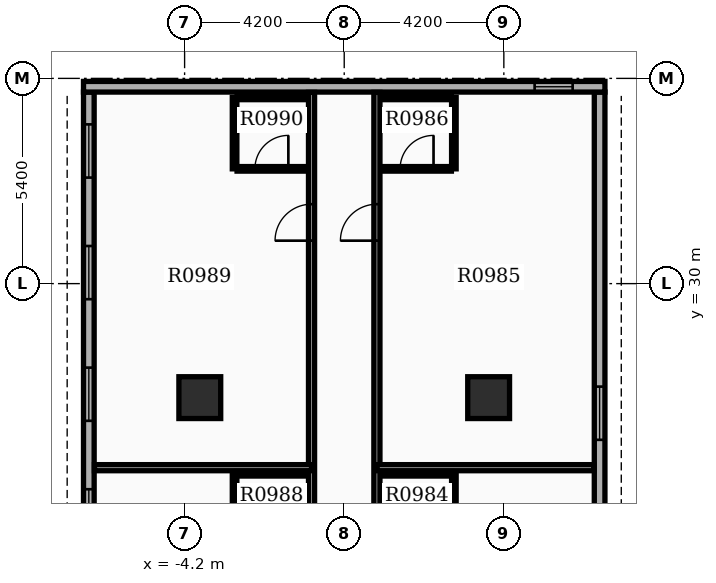
"""IFC4 building model, lengths in metres.
Left out: names, types, materials, properties, quantities, classifications, styles, units other than length and angle.
Written with IfcOpenShell. Run it as: python <this file> out.ifc"""

import sys

from ifc_helpers import new_model, si_unit, direction, frame, frame_2d, origin, origin_2d, place, context, subcontext, project, spatial, rectangle, extrude, element, fill, save


model = new_model("IFC4")
c1 = context("Model", 3, precision=1e-05, world=origin(), true_north=direction((0.0, 1.0)))
c2 = subcontext(c1, "Body", "Model", "MODEL_VIEW")
j1 = project(units=[si_unit("LENGTHUNIT", "METRE"), si_unit("PLANEANGLEUNIT", "RADIAN")], contexts=[c1])
p1 = place(None, origin())
s1 = spatial("IfcSite", under=j1, at=p1, CompositionType="ELEMENT")
p2 = place(p1, origin())
s2 = spatial("IfcBuilding", under=s1, at=p2, CompositionType="ELEMENT")
p3 = place(p2, frame((0.0, 0.0, 63.9)))
s3 = spatial("IfcBuildingStorey", under=s2, at=p3, CompositionType="ELEMENT", Elevation=63.9)
for number, where, z_axis, x_axis in (
    (1, (-3.8, 27.0, 0.0), (0.0, 0.0, 1.0), (1.0, 0.0, 0.0)),
    (2, (3.8, 27.0, 0.0), (0.0, 0.0, 1.0), (1.0, 0.0, 0.0)),
):
    element("IfcColumn", number, at=place(p3, frame(where, z_axis=z_axis, x_axis=x_axis)), inside=s3, PredefinedType="COLUMN", context=c2, shape_type="SweptSolid", body=[
        extrude(rectangle(XDim=1.1, YDim=1.1, at=origin_2d()), origin(), (0.0, 0.0, 1.0), 3.9),
    ])
p4 = place(p3, frame((6.72, 14.94, 0.0), z_axis=(0.0, 0.0, 1.0), x_axis=(0.0, 1.0, 0.0)))
e3 = element("IfcWall", 3, at=p4, inside=s3, PredefinedType="STANDARD", context=c2, shape_type="SweptSolid", body=[
    extrude(rectangle(XDim=20.1, YDim=0.28, at=frame_2d((10.05, 0.0))), origin(), (0.0, 0.0, 1.0), 2.91),
])
p5 = place(p4, frame((0.85, 0.0, 0.8)))
e4 = element("IfcOpeningElement", 4, at=p5, cuts=e3, PredefinedType="OPENING", context=c2, shape_type="SweptSolid", body=[
    extrude(rectangle(XDim=1.4, YDim=1.6, at=frame_2d((0.7, 0.8))), frame((0.0, 0.15, 0.0), z_axis=(0.0, -1.0, 0.0), x_axis=(1.0, 0.0, 0.0)), (0.0, 0.0, 1.0), 0.3),
])
p6 = place(p4, frame((4.05, 0.0, 0.8)))
e5 = element("IfcOpeningElement", 5, at=p6, cuts=e3, PredefinedType="OPENING", context=c2, shape_type="SweptSolid", body=[
    extrude(rectangle(XDim=1.4, YDim=1.6, at=frame_2d((0.7, 0.8))), frame((0.0, 0.15, 0.0), z_axis=(0.0, -1.0, 0.0), x_axis=(1.0, 0.0, 0.0)), (0.0, 0.0, 1.0), 0.3),
])
p7 = place(p4, frame((7.25, 0.0, 0.8)))
e6 = element("IfcOpeningElement", 6, at=p7, cuts=e3, PredefinedType="OPENING", context=c2, shape_type="SweptSolid", body=[
    extrude(rectangle(XDim=1.4, YDim=1.6, at=frame_2d((0.7, 0.8))), frame((0.0, 0.15, 0.0), z_axis=(0.0, -1.0, 0.0), x_axis=(1.0, 0.0, 0.0)), (0.0, 0.0, 1.0), 0.3),
])
p8 = place(p4, frame((10.95, 0.0, 0.8)))
e7 = element("IfcOpeningElement", 7, at=p8, cuts=e3, PredefinedType="OPENING", context=c2, shape_type="SweptSolid", body=[
    extrude(rectangle(XDim=1.4, YDim=1.6, at=frame_2d((0.7, 0.8))), frame((0.0, 0.15, 0.0), z_axis=(0.0, -1.0, 0.0), x_axis=(1.0, 0.0, 0.0)), (0.0, 0.0, 1.0), 0.3),
])
p9 = place(p3, frame((-6.72, 35.04, 0.0), z_axis=(0.0, 0.0, 1.0), x_axis=(0.0, -1.0, 0.0)))
e8 = element("IfcWall", 8, at=p9, inside=s3, PredefinedType="STANDARD", context=c2, shape_type="SweptSolid", body=[
    extrude(rectangle(XDim=20.1, YDim=0.28, at=frame_2d((10.05, 0.0))), origin(), (0.0, 0.0, 1.0), 2.91),
])
p10 = place(p9, frame((0.85, 0.0, 0.8)))
e9 = element("IfcOpeningElement", 9, at=p10, cuts=e8, PredefinedType="OPENING", context=c2, shape_type="SweptSolid", body=[
    extrude(rectangle(XDim=1.4, YDim=1.6, at=frame_2d((0.7, 0.8))), frame((0.0, 0.15, 0.0), z_axis=(0.0, -1.0, 0.0), x_axis=(1.0, 0.0, 0.0)), (0.0, 0.0, 1.0), 0.3),
])
p11 = place(p9, frame((4.05, 0.0, 0.8)))
e10 = element("IfcOpeningElement", 10, at=p11, cuts=e8, PredefinedType="OPENING", context=c2, shape_type="SweptSolid", body=[
    extrude(rectangle(XDim=1.4, YDim=1.6, at=frame_2d((0.7, 0.8))), frame((0.0, 0.15, 0.0), z_axis=(0.0, -1.0, 0.0), x_axis=(1.0, 0.0, 0.0)), (0.0, 0.0, 1.0), 0.3),
])
p12 = place(p9, frame((7.25, 0.0, 0.8)))
e11 = element("IfcOpeningElement", 11, at=p12, cuts=e8, PredefinedType="OPENING", context=c2, shape_type="SweptSolid", body=[
    extrude(rectangle(XDim=1.4, YDim=1.6, at=frame_2d((0.7, 0.8))), frame((0.0, 0.15, 0.0), z_axis=(0.0, -1.0, 0.0), x_axis=(1.0, 0.0, 0.0)), (0.0, 0.0, 1.0), 0.3),
])
p13 = place(p9, frame((10.45, 0.0, 0.8)))
e12 = element("IfcOpeningElement", 12, at=p13, cuts=e8, PredefinedType="OPENING", context=c2, shape_type="SweptSolid", body=[
    extrude(rectangle(XDim=1.4, YDim=1.6, at=frame_2d((0.7, 0.8))), frame((0.0, 0.15, 0.0), z_axis=(0.0, -1.0, 0.0), x_axis=(1.0, 0.0, 0.0)), (0.0, 0.0, 1.0), 0.3),
])
p14 = place(p3, frame((6.86, 35.18, 0.0), z_axis=(0.0, 0.0, 1.0), x_axis=(-1.0, 0.0, 0.0)))
e13 = element("IfcWall", 13, at=p14, inside=s3, PredefinedType="STANDARD", context=c2, shape_type="SweptSolid", body=[
    extrude(rectangle(XDim=13.72, YDim=0.28, at=frame_2d((6.86, 0.0))), origin(), (0.0, 0.0, 1.0), 2.91),
])
p15 = place(p14, frame((0.85, 0.0, 0.85)))
e14 = element("IfcOpeningElement", 14, at=p15, cuts=e13, PredefinedType="OPENING", context=c2, shape_type="SweptSolid", body=[
    extrude(rectangle(XDim=1.0, YDim=1.5, at=frame_2d((0.5, 0.75))), frame((0.0, 0.15, 0.0), z_axis=(0.0, -1.0, 0.0), x_axis=(1.0, 0.0, 0.0)), (0.0, 0.0, 1.0), 0.3),
])
p16 = place(p3, frame((0.86, 14.85, 0.0), z_axis=(0.0, 0.0, 1.0), x_axis=(0.0, 1.0, 0.0)))
e15 = element("IfcWall", 15, at=p16, inside=s3, PredefinedType="PARTITIONING", context=c2, shape_type="SweptSolid", body=[
    extrude(rectangle(XDim=20.182, YDim=0.16, at=frame_2d((10.091, 0.0))), origin(), (0.0, 0.0, 1.0), 2.9),
])
p17 = place(p16, frame((1.106, 0.0, 0.0)))
e16 = element("IfcOpeningElement", 16, at=p17, cuts=e15, PredefinedType="OPENING", context=c2, shape_type="SweptSolid", body=[
    extrude(rectangle(XDim=0.96, YDim=2.15, at=frame_2d((0.48, 1.075))), frame((0.0, 0.09, 0.0), z_axis=(0.0, -1.0, 0.0), x_axis=(1.0, 0.0, 0.0)), (0.0, 0.0, 1.0), 0.18),
])
p18 = place(p16, frame((16.28, 0.0, 0.0)))
e17 = element("IfcOpeningElement", 17, at=p18, cuts=e15, PredefinedType="OPENING", context=c2, shape_type="SweptSolid", body=[
    extrude(rectangle(XDim=0.96, YDim=2.15, at=frame_2d((0.48, 1.075))), frame((0.0, 0.09, 0.0), z_axis=(0.0, -1.0, 0.0), x_axis=(1.0, 0.0, 0.0)), (0.0, 0.0, 1.0), 0.18),
])
p19 = place(p3, frame((0.86, 25.157, 0.0), z_axis=(0.0, 0.0, 1.0), x_axis=(1.0, 0.0, 0.0)))
e18 = element("IfcWall", 18, at=p19, inside=s3, PredefinedType="PARTITIONING", context=c2, shape_type="SweptSolid", body=[
    extrude(rectangle(XDim=5.712, YDim=0.16, at=frame_2d((2.856, 0.0))), origin(), (0.0, 0.0, 1.0), 2.9),
])
p20 = place(p3, frame((1.0, 24.997, 0.0), z_axis=(0.0, 0.0, 1.0), x_axis=(1.0, 0.0, 0.0)))
e19 = element("IfcWall", 19, at=p20, inside=s3, PredefinedType="PARTITIONING", context=c2, shape_type="SweptSolid", body=[
    extrude(rectangle(XDim=1.82, YDim=0.12, at=frame_2d((0.91, 0.0))), origin(), (0.0, 0.0, 1.0), 2.9),
])
p21 = place(p3, frame((2.885, 23.117, 0.0), z_axis=(0.0, 0.0, 1.0), x_axis=(0.0, 1.0, 0.0)))
e20 = element("IfcWall", 20, at=p21, inside=s3, PredefinedType="PARTITIONING", context=c2, shape_type="SweptSolid", body=[
    extrude(rectangle(XDim=1.88, YDim=0.12, at=frame_2d((0.94, 0.0))), origin(), (0.0, 0.0, 1.0), 2.9),
])
p22 = place(p3, frame((1.0, 33.02, 0.0), z_axis=(0.0, 0.0, 1.0), x_axis=(1.0, 0.0, 0.0)))
e21 = element("IfcWall", 21, at=p22, inside=s3, PredefinedType="PARTITIONING", context=c2, shape_type="SweptSolid", body=[
    extrude(rectangle(XDim=1.82, YDim=0.12, at=frame_2d((0.91, 0.0))), origin(), (0.0, 0.0, 1.0), 2.9),
])
p23 = place(p22, frame((0.47, 0.0, 0.0)))
e22 = element("IfcOpeningElement", 22, at=p23, cuts=e21, PredefinedType="OPENING", context=c2, shape_type="SweptSolid", body=[
    extrude(rectangle(XDim=0.88, YDim=2.1, at=frame_2d((0.44, 1.05))), frame((0.0, 0.07, 0.0), z_axis=(0.0, -1.0, 0.0), x_axis=(1.0, 0.0, 0.0)), (0.0, 0.0, 1.0), 0.14),
])
p24 = place(p3, frame((1.0, 34.9, 0.0), z_axis=(0.0, 0.0, 1.0), x_axis=(1.0, 0.0, 0.0)))
e23 = element("IfcWall", 23, at=p24, inside=s3, PredefinedType="PARTITIONING", context=c2, shape_type="SweptSolid", body=[
    extrude(rectangle(XDim=1.82, YDim=0.12, at=frame_2d((0.91, 0.0))), origin(), (0.0, 0.0, 1.0), 2.9),
])
p25 = place(p3, frame((2.885, 33.02, 0.0), z_axis=(0.0, 0.0, 1.0), x_axis=(0.0, 1.0, 0.0)))
e24 = element("IfcWall", 24, at=p25, inside=s3, PredefinedType="PARTITIONING", context=c2, shape_type="SweptSolid", body=[
    extrude(rectangle(XDim=1.88, YDim=0.12, at=frame_2d((0.94, 0.0))), origin(), (0.0, 0.0, 1.0), 2.9),
])
p26 = place(p3, frame((-0.86, 14.85, 0.0), z_axis=(0.0, 0.0, 1.0), x_axis=(0.0, 1.0, 0.0)))
e25 = element("IfcWall", 25, at=p26, inside=s3, PredefinedType="PARTITIONING", context=c2, shape_type="SweptSolid", body=[
    extrude(rectangle(XDim=20.182, YDim=0.16, at=frame_2d((10.091, 0.0))), origin(), (0.0, 0.0, 1.0), 2.9),
])
p27 = place(p26, frame((1.106, 0.0, 0.0)))
e26 = element("IfcOpeningElement", 26, at=p27, cuts=e25, PredefinedType="OPENING", context=c2, shape_type="SweptSolid", body=[
    extrude(rectangle(XDim=0.96, YDim=2.15, at=frame_2d((0.48, 1.075))), frame((0.0, 0.09, 0.0), z_axis=(0.0, -1.0, 0.0), x_axis=(1.0, 0.0, 0.0)), (0.0, 0.0, 1.0), 0.18),
])
p28 = place(p26, frame((16.28, 0.0, 0.0)))
e27 = element("IfcOpeningElement", 27, at=p28, cuts=e25, PredefinedType="OPENING", context=c2, shape_type="SweptSolid", body=[
    extrude(rectangle(XDim=0.96, YDim=2.15, at=frame_2d((0.48, 1.075))), frame((0.0, 0.09, 0.0), z_axis=(0.0, -1.0, 0.0), x_axis=(1.0, 0.0, 0.0)), (0.0, 0.0, 1.0), 0.18),
])
p29 = place(p3, frame((-0.86, 25.157, 0.0), z_axis=(0.0, 0.0, 1.0), x_axis=(-1.0, 0.0, 0.0)))
e28 = element("IfcWall", 28, at=p29, inside=s3, PredefinedType="PARTITIONING", context=c2, shape_type="SweptSolid", body=[
    extrude(rectangle(XDim=5.712, YDim=0.16, at=frame_2d((2.856, 0.0))), origin(), (0.0, 0.0, 1.0), 2.9),
])
p30 = place(p3, frame((-2.82, 24.997, 0.0), z_axis=(0.0, 0.0, 1.0), x_axis=(1.0, 0.0, 0.0)))
e29 = element("IfcWall", 29, at=p30, inside=s3, PredefinedType="PARTITIONING", context=c2, shape_type="SweptSolid", body=[
    extrude(rectangle(XDim=1.82, YDim=0.12, at=frame_2d((0.91, 0.0))), origin(), (0.0, 0.0, 1.0), 2.9),
])
p31 = place(p3, frame((-2.885, 23.117, 0.0), z_axis=(0.0, 0.0, 1.0), x_axis=(0.0, 1.0, 0.0)))
e30 = element("IfcWall", 30, at=p31, inside=s3, PredefinedType="PARTITIONING", context=c2, shape_type="SweptSolid", body=[
    extrude(rectangle(XDim=1.88, YDim=0.12, at=frame_2d((0.94, 0.0))), origin(), (0.0, 0.0, 1.0), 2.9),
])
p32 = place(p3, frame((-2.82, 33.02, 0.0), z_axis=(0.0, 0.0, 1.0), x_axis=(1.0, 0.0, 0.0)))
e31 = element("IfcWall", 31, at=p32, inside=s3, PredefinedType="PARTITIONING", context=c2, shape_type="SweptSolid", body=[
    extrude(rectangle(XDim=1.82, YDim=0.12, at=frame_2d((0.91, 0.0))), origin(), (0.0, 0.0, 1.0), 2.9),
])
p33 = place(p32, frame((0.47, 0.0, 0.0)))
e32 = element("IfcOpeningElement", 32, at=p33, cuts=e31, PredefinedType="OPENING", context=c2, shape_type="SweptSolid", body=[
    extrude(rectangle(XDim=0.88, YDim=2.1, at=frame_2d((0.44, 1.05))), frame((0.0, 0.07, 0.0), z_axis=(0.0, -1.0, 0.0), x_axis=(1.0, 0.0, 0.0)), (0.0, 0.0, 1.0), 0.14),
])
p34 = place(p3, frame((-2.82, 34.9, 0.0), z_axis=(0.0, 0.0, 1.0), x_axis=(1.0, 0.0, 0.0)))
e33 = element("IfcWall", 33, at=p34, inside=s3, PredefinedType="PARTITIONING", context=c2, shape_type="SweptSolid", body=[
    extrude(rectangle(XDim=1.82, YDim=0.12, at=frame_2d((0.91, 0.0))), origin(), (0.0, 0.0, 1.0), 2.9),
])
p35 = place(p3, frame((-2.885, 33.02, 0.0), z_axis=(0.0, 0.0, 1.0), x_axis=(0.0, 1.0, 0.0)))
e34 = element("IfcWall", 34, at=p35, inside=s3, PredefinedType="PARTITIONING", context=c2, shape_type="SweptSolid", body=[
    extrude(rectangle(XDim=1.88, YDim=0.12, at=frame_2d((0.94, 0.0))), origin(), (0.0, 0.0, 1.0), 2.9),
])
p36 = place(p8, origin())
e35 = element("IfcWindow", 35, at=p36, inside=s3, PartitioningType="SINGLE_PANEL", PredefinedType="WINDOW", context=c2, shape_type="SweptSolid", body=[
    extrude(rectangle(XDim=1.4, YDim=1.6, at=frame_2d((0.7, 0.8))), frame((0.0, 0.03, 0.0), z_axis=(0.0, -1.0, 0.0), x_axis=(1.0, 0.0, 0.0)), (0.0, 0.0, 1.0), 0.06),
])
fill(e7, e35)
p37 = place(p10, origin())
e36 = element("IfcWindow", 36, at=p37, inside=s3, PartitioningType="SINGLE_PANEL", PredefinedType="WINDOW", context=c2, shape_type="SweptSolid", body=[
    extrude(rectangle(XDim=1.4, YDim=1.6, at=frame_2d((0.7, 0.8))), frame((0.0, 0.03, 0.0), z_axis=(0.0, -1.0, 0.0), x_axis=(1.0, 0.0, 0.0)), (0.0, 0.0, 1.0), 0.06),
])
fill(e9, e36)
p38 = place(p11, origin())
e37 = element("IfcWindow", 37, at=p38, inside=s3, PartitioningType="SINGLE_PANEL", PredefinedType="WINDOW", context=c2, shape_type="SweptSolid", body=[
    extrude(rectangle(XDim=1.4, YDim=1.6, at=frame_2d((0.7, 0.8))), frame((0.0, 0.03, 0.0), z_axis=(0.0, -1.0, 0.0), x_axis=(1.0, 0.0, 0.0)), (0.0, 0.0, 1.0), 0.06),
])
fill(e10, e37)
p39 = place(p12, origin())
e38 = element("IfcWindow", 38, at=p39, inside=s3, PartitioningType="SINGLE_PANEL", PredefinedType="WINDOW", context=c2, shape_type="SweptSolid", body=[
    extrude(rectangle(XDim=1.4, YDim=1.6, at=frame_2d((0.7, 0.8))), frame((0.0, 0.03, 0.0), z_axis=(0.0, -1.0, 0.0), x_axis=(1.0, 0.0, 0.0)), (0.0, 0.0, 1.0), 0.06),
])
fill(e11, e38)
p40 = place(p13, origin())
e39 = element("IfcWindow", 39, at=p40, inside=s3, PartitioningType="SINGLE_PANEL", PredefinedType="WINDOW", context=c2, shape_type="SweptSolid", body=[
    extrude(rectangle(XDim=1.4, YDim=1.6, at=frame_2d((0.7, 0.8))), frame((0.0, 0.03, 0.0), z_axis=(0.0, -1.0, 0.0), x_axis=(1.0, 0.0, 0.0)), (0.0, 0.0, 1.0), 0.06),
])
fill(e12, e39)
p41 = place(p15, origin())
e40 = element("IfcWindow", 40, at=p41, inside=s3, PartitioningType="SINGLE_PANEL", PredefinedType="WINDOW", context=c2, shape_type="SweptSolid", body=[
    extrude(rectangle(XDim=1.0, YDim=1.5, at=frame_2d((0.5, 0.75))), frame((0.0, 0.03, 0.0), z_axis=(0.0, -1.0, 0.0), x_axis=(1.0, 0.0, 0.0)), (0.0, 0.0, 1.0), 0.06),
])
fill(e14, e40)
p42 = place(p18, origin())
e41 = element("IfcDoor", 41, at=p42, inside=s3, OperationType="SINGLE_SWING_LEFT", PredefinedType="DOOR", context=c2, shape_type="SweptSolid", body=[
    extrude(rectangle(XDim=0.96, YDim=2.15, at=frame_2d((0.48, 1.075))), frame((0.0, 0.025, 0.0), z_axis=(0.0, -1.0, 0.0), x_axis=(1.0, 0.0, 0.0)), (0.0, 0.0, 1.0), 0.05),
])
fill(e17, e41)
p43 = place(p23, origin())
e42 = element("IfcDoor", 42, at=p43, inside=s3, OperationType="SINGLE_SWING_RIGHT", PredefinedType="DOOR", context=c2, shape_type="SweptSolid", body=[
    extrude(rectangle(XDim=0.88, YDim=2.1, at=frame_2d((0.44, 1.05))), frame((0.0, 0.025, 0.0), z_axis=(0.0, -1.0, 0.0), x_axis=(1.0, 0.0, 0.0)), (0.0, 0.0, 1.0), 0.05),
])
fill(e22, e42)
p44 = place(p28, origin())
e43 = element("IfcDoor", 43, at=p44, inside=s3, OperationType="SINGLE_SWING_LEFT", PredefinedType="DOOR", context=c2, shape_type="SweptSolid", body=[
    extrude(rectangle(XDim=0.96, YDim=2.15, at=frame_2d((0.48, 1.075))), frame((0.0, 0.025, 0.0), z_axis=(0.0, -1.0, 0.0), x_axis=(1.0, 0.0, 0.0)), (0.0, 0.0, 1.0), 0.05),
])
fill(e27, e43)
p45 = place(p33, origin())
e44 = element("IfcDoor", 44, at=p45, inside=s3, OperationType="SINGLE_SWING_RIGHT", PredefinedType="DOOR", context=c2, shape_type="SweptSolid", body=[
    extrude(rectangle(XDim=0.88, YDim=2.1, at=frame_2d((0.44, 1.05))), frame((0.0, 0.025, 0.0), z_axis=(0.0, -1.0, 0.0), x_axis=(1.0, 0.0, 0.0)), (0.0, 0.0, 1.0), 0.05),
])
fill(e32, e44)
save(model, sys.argv[1])
